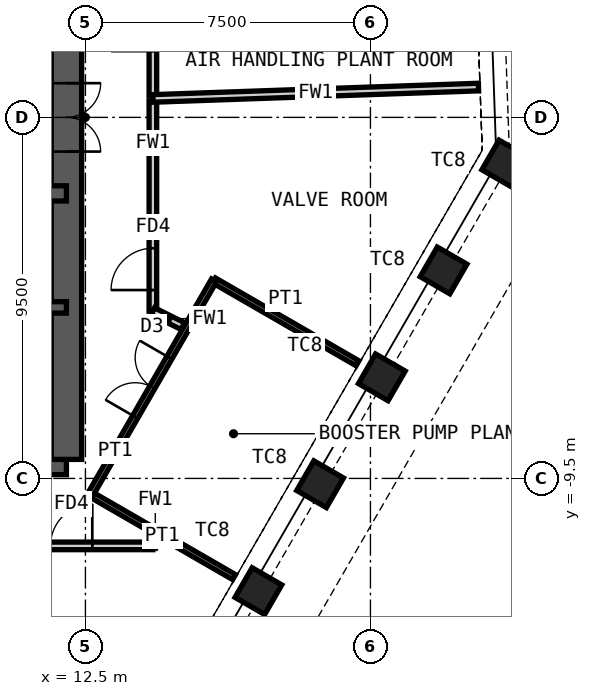
"""IFC4 building model, lengths in metres.
Left out: names, types, materials, properties, quantities, classifications, styles, units other than length and angle.
Written with IfcOpenShell. Run it as: python <this file> out.ifc"""

import sys

from ifc_helpers import new_model, si_unit, direction, frame, frame_2d, origin, origin_2d, place, context, subcontext, project, spatial, rectangle, hollow_rectangle, extrude, element, fill, save


model = new_model("IFC4")
c1 = context("Model", 3, precision=1e-05, world=origin(), true_north=direction((0.0, 1.0)))
c2 = subcontext(c1, "Body", "Model", "MODEL_VIEW")
j1 = project(units=[si_unit("LENGTHUNIT", "METRE"), si_unit("PLANEANGLEUNIT", "RADIAN")], contexts=[c1])
p1 = place(None, origin())
s1 = spatial("IfcSite", under=j1, at=p1, CompositionType="ELEMENT")
p2 = place(p1, origin())
s2 = spatial("IfcBuilding", under=s1, at=p2, CompositionType="ELEMENT")
p3 = place(p2, frame((0.0, 0.0, 337.6)))
s3 = spatial("IfcBuildingStorey", under=s2, at=p3, CompositionType="ELEMENT", Elevation=337.6)
for number, where, z_axis, x_axis in (
    (1, (23.548, -1.214, 0.0), (0.0, 0.0, 1.0), (0.5, 0.866, 0.0)),
    (2, (21.924, -4.027, 0.0), (0.0, 0.0, 1.0), (0.5, 0.866, 0.0)),
    (3, (20.3, -6.84, 0.0), (0.0, 0.0, 1.0), (0.5, 0.866, 0.0)),
    (4, (18.676, -9.653, 0.0), (0.0, 0.0, 1.0), (0.5, 0.866, 0.0)),
    (5, (17.052, -12.466, 0.0), (0.0, 0.0, 1.0), (0.5, 0.866, 0.0)),
):
    element("IfcColumn", number, at=place(p3, frame(where, z_axis=z_axis, x_axis=x_axis)), inside=s3, PredefinedType="COLUMN", context=c2, shape_type="SweptSolid", body=[
        extrude(hollow_rectangle(XDim=0.9, YDim=0.9, WallThickness=0.05, at=origin_2d()), origin(), (0.0, 0.0, 1.0), 6.0),
    ])
p4 = place(p3, frame((-12.0, -9.0, 0.0), z_axis=(0.0, 0.0, 1.0), x_axis=(1.0, 0.0, 0.0)))
e6 = element("IfcWall", 6, at=p4, inside=s3, PredefinedType="SHEAR", context=c2, shape_type="SweptSolid", body=[
    extrude(rectangle(XDim=24.0, YDim=0.8, at=frame_2d((12.0, 0.0))), origin(), (0.0, 0.0, 1.0), 6.0),
])
p5 = place(p4, frame((1.35, 0.0, 0.0)))
e7 = element("IfcOpeningElement", 7, at=p5, cuts=e6, PredefinedType="OPENING", context=c2, shape_type="SweptSolid", body=[
    extrude(rectangle(XDim=1.0, YDim=2.1, at=frame_2d((0.5, 1.05))), frame((0.0, 0.41, 0.0), z_axis=(0.0, -1.0, 0.0), x_axis=(1.0, 0.0, 0.0)), (0.0, 0.0, 1.0), 0.82),
])
p6 = place(p4, frame((5.325, 0.0, 0.0)))
e8 = element("IfcOpeningElement", 8, at=p6, cuts=e6, PredefinedType="OPENING", context=c2, shape_type="SweptSolid", body=[
    extrude(rectangle(XDim=1.15, YDim=2.1, at=frame_2d((0.575, 1.05))), frame((0.0, 0.41, 0.0), z_axis=(0.0, -1.0, 0.0), x_axis=(1.0, 0.0, 0.0)), (0.0, 0.0, 1.0), 0.82),
])
p7 = place(p4, frame((12.6, 0.0, 0.0)))
e9 = element("IfcOpeningElement", 9, at=p7, cuts=e6, PredefinedType="OPENING", context=c2, shape_type="SweptSolid", body=[
    extrude(rectangle(XDim=1.0, YDim=2.1, at=frame_2d((0.5, 1.05))), frame((0.0, 0.41, 0.0), z_axis=(0.0, -1.0, 0.0), x_axis=(1.0, 0.0, 0.0)), (0.0, 0.0, 1.0), 0.82),
])
p8 = place(p3, frame((12.0, -9.0, 0.0), z_axis=(0.0, 0.0, 1.0), x_axis=(0.0, 1.0, 0.0)))
e10 = element("IfcWall", 10, at=p8, inside=s3, PredefinedType="SHEAR", context=c2, shape_type="SweptSolid", body=[
    extrude(rectangle(XDim=18.0, YDim=0.8, at=frame_2d((9.0, 0.0))), origin(), (0.0, 0.0, 1.0), 6.0),
])
p9 = place(p8, frame((8.1, 0.0, 0.0)))
e11 = element("IfcOpeningElement", 11, at=p9, cuts=e10, PredefinedType="OPENING", context=c2, shape_type="SweptSolid", body=[
    extrude(rectangle(XDim=1.8, YDim=2.1, at=frame_2d((0.9, 1.05))), frame((0.0, 0.41, 0.0), z_axis=(0.0, -1.0, 0.0), x_axis=(1.0, 0.0, 0.0)), (0.0, 0.0, 1.0), 0.82),
])
p10 = place(p3, frame((-12.0, -2.0, 0.0), z_axis=(0.0, 0.0, 1.0), x_axis=(1.0, 0.0, 0.0)))
e12 = element("IfcWall", 12, at=p10, inside=s3, PredefinedType="SHEAR", context=c2, shape_type="SweptSolid", body=[
    extrude(rectangle(XDim=24.0, YDim=0.4, at=frame_2d((12.0, 0.0))), origin(), (0.0, 0.0, 1.0), 6.0),
])
p11 = place(p10, frame((1.1, 0.0, 0.0)))
e13 = element("IfcOpeningElement", 13, at=p11, cuts=e12, PredefinedType="OPENING", context=c2, shape_type="SweptSolid", body=[
    extrude(rectangle(XDim=1.1, YDim=2.1, at=frame_2d((0.55, 1.05))), frame((0.0, 0.21, 0.0), z_axis=(0.0, -1.0, 0.0), x_axis=(1.0, 0.0, 0.0)), (0.0, 0.0, 1.0), 0.42),
])
p12 = place(p10, frame((13.55, 0.0, 0.0)))
e14 = element("IfcOpeningElement", 14, at=p12, cuts=e12, PredefinedType="OPENING", context=c2, shape_type="SweptSolid", body=[
    extrude(rectangle(XDim=1.1, YDim=2.1, at=frame_2d((0.55, 1.05))), frame((0.0, 0.21, 0.0), z_axis=(0.0, -1.0, 0.0), x_axis=(1.0, 0.0, 0.0)), (0.0, 0.0, 1.0), 0.42),
])
p13 = place(p10, frame((20.7, 0.0, 0.0)))
e15 = element("IfcOpeningElement", 15, at=p13, cuts=e12, PredefinedType="OPENING", context=c2, shape_type="SweptSolid", body=[
    extrude(rectangle(XDim=1.1, YDim=2.1, at=frame_2d((0.55, 1.05))), frame((0.0, 0.21, 0.0), z_axis=(0.0, -1.0, 0.0), x_axis=(1.0, 0.0, 0.0)), (0.0, 0.0, 1.0), 0.42),
])
p14 = place(p10, frame((4.0, 0.0, 0.0)))
e16 = element("IfcOpeningElement", 16, at=p14, cuts=e12, PredefinedType="OPENING", context=c2, shape_type="SweptSolid", body=[
    extrude(rectangle(XDim=1.0, YDim=2.1, at=frame_2d((0.5, 1.05))), frame((0.0, 0.21, 0.0), z_axis=(0.0, -1.0, 0.0), x_axis=(1.0, 0.0, 0.0)), (0.0, 0.0, 1.0), 0.42),
])
p15 = place(p10, frame((6.8, 0.0, 0.0)))
e17 = element("IfcOpeningElement", 17, at=p15, cuts=e12, PredefinedType="OPENING", context=c2, shape_type="SweptSolid", body=[
    extrude(rectangle(XDim=1.0, YDim=2.1, at=frame_2d((0.5, 1.05))), frame((0.0, 0.21, 0.0), z_axis=(0.0, -1.0, 0.0), x_axis=(1.0, 0.0, 0.0)), (0.0, 0.0, 1.0), 0.42),
])
p16 = place(p10, frame((9.6, 0.0, 0.0)))
e18 = element("IfcOpeningElement", 18, at=p16, cuts=e12, PredefinedType="OPENING", context=c2, shape_type="SweptSolid", body=[
    extrude(rectangle(XDim=1.0, YDim=2.1, at=frame_2d((0.5, 1.05))), frame((0.0, 0.21, 0.0), z_axis=(0.0, -1.0, 0.0), x_axis=(1.0, 0.0, 0.0)), (0.0, 0.0, 1.0), 0.42),
])
p17 = place(p3, frame((-12.0, -5.0, 0.0), z_axis=(0.0, 0.0, 1.0), x_axis=(1.0, 0.0, 0.0)))
e19 = element("IfcWall", 19, at=p17, inside=s3, PredefinedType="SHEAR", context=c2, shape_type="SweptSolid", body=[
    extrude(rectangle(XDim=24.0, YDim=0.3, at=frame_2d((12.0, 0.0))), origin(), (0.0, 0.0, 1.0), 6.0),
])
p18 = place(p3, frame((19.659, -6.47, 0.0), z_axis=(0.0, 0.0, 1.0), x_axis=(-0.866032659912, 0.499987431809, 0.0)))
e20 = element("IfcWall", 20, at=p18, inside=s3, PredefinedType="PARTITIONING", context=c2, shape_type="SweptSolid", body=[
    extrude(rectangle(XDim=4.36, YDim=0.15, at=frame_2d((2.18, 0.0))), origin(), (0.0, 0.0, 1.0), 4.65),
])
p19 = place(p3, frame((16.411, -12.096, 0.0), z_axis=(0.0, 0.0, 1.0), x_axis=(-0.866032659912, 0.499987431809, 0.0)))
e21 = element("IfcWall", 21, at=p19, inside=s3, PredefinedType="PARTITIONING", context=c2, shape_type="SweptSolid", body=[
    extrude(rectangle(XDim=4.36, YDim=0.15, at=frame_2d((2.18, 0.0))), origin(), (0.0, 0.0, 1.0), 4.85),
])
p20 = place(p3, frame((15.883, -4.29, 0.0), z_axis=(0.0, 0.0, 1.0), x_axis=(-0.500003318956, -0.866023487576, 0.0)))
e22 = element("IfcWall", 22, at=p20, inside=s3, PredefinedType="PARTITIONING", context=c2, shape_type="SweptSolid", body=[
    extrude(rectangle(XDim=6.496, YDim=0.15, at=frame_2d((3.248, 0.0))), origin(), (0.0, 0.0, 1.0), 5.75),
])
p21 = place(p20, frame((2.348, 0.0, 0.0)))
e23 = element("IfcOpeningElement", 23, at=p21, cuts=e22, PredefinedType="OPENING", context=c2, shape_type="SweptSolid", body=[
    extrude(rectangle(XDim=1.8, YDim=2.4, at=frame_2d((0.9, 1.2))), frame((0.0, 0.085, 0.0), z_axis=(0.0, -1.0, 0.0), x_axis=(1.0, 0.0, 0.0)), (0.0, 0.0, 1.0), 0.17),
])
p22 = place(p3, frame((14.275, -11.275, 0.0), z_axis=(0.0, 0.0, 1.0), x_axis=(-1.0, 0.0, 0.0)))
e24 = element("IfcWall", 24, at=p22, inside=s3, PredefinedType="PARTITIONING", context=c2, shape_type="SweptSolid", body=[
    extrude(rectangle(XDim=7.146, YDim=0.2, at=frame_2d((3.573, 0.0))), origin(), (0.0, 0.0, 1.0), 5.75),
])
p23 = place(p22, frame((1.594, 0.0, 0.0)))
e25 = element("IfcOpeningElement", 25, at=p23, cuts=e24, PredefinedType="OPENING", context=c2, shape_type="SweptSolid", body=[
    extrude(rectangle(XDim=1.1, YDim=2.1, at=frame_2d((0.55, 1.05))), frame((0.0, 0.11, 0.0), z_axis=(0.0, -1.0, 0.0), x_axis=(1.0, 0.0, 0.0)), (0.0, 0.0, 1.0), 0.22),
])
p24 = place(p3, frame((14.275, -11.275, 0.0), z_axis=(0.0, 0.0, 1.0), x_axis=(0.500616342655, 0.865669265636, 0.0)))
e26 = element("IfcWall", 26, at=p24, inside=s3, PredefinedType="PARTITIONING", context=c2, shape_type="SweptSolid", body=[
    extrude(rectangle(XDim=0.252, YDim=0.2, at=frame_2d((0.126, 0.0))), origin(), (0.0, 0.0, 1.0), 5.75),
])
p25 = place(p3, frame((14.275, 0.432, 0.0), z_axis=(0.0, 0.0, 1.0), x_axis=(0.0, -1.0, 0.0)))
e27 = element("IfcWall", 27, at=p25, inside=s3, PredefinedType="PARTITIONING", context=c2, shape_type="SweptSolid", body=[
    extrude(rectangle(XDim=5.532, YDim=0.2, at=frame_2d((2.766, 0.0))), origin(), (0.0, 0.0, 1.0), 5.75),
])
p26 = place(p25, frame((3.876, 0.0, 0.0)))
e28 = element("IfcOpeningElement", 28, at=p26, cuts=e27, PredefinedType="OPENING", context=c2, shape_type="SweptSolid", body=[
    extrude(rectangle(XDim=1.1, YDim=2.1, at=frame_2d((0.55, 1.05))), frame((0.0, 0.11, 0.0), z_axis=(0.0, -1.0, 0.0), x_axis=(1.0, 0.0, 0.0)), (0.0, 0.0, 1.0), 0.22),
])
p27 = place(p3, frame((14.275, -5.1, 0.0), z_axis=(0.0, 0.0, 1.0), x_axis=(0.895092932875, -0.445879626712, 0.0)))
e29 = element("IfcWall", 29, at=p27, inside=s3, PredefinedType="PARTITIONING", context=c2, shape_type="SweptSolid", body=[
    extrude(rectangle(XDim=0.879, YDim=0.2, at=frame_2d((0.439, 0.0))), origin(), (0.0, 0.0, 1.0), 4.65),
])
p28 = place(p3, frame((14.275, 6.32, 0.0), z_axis=(0.0, 0.0, 1.0), x_axis=(0.0, -1.0, 0.0)))
e30 = element("IfcWall", 30, at=p28, inside=s3, PredefinedType="PARTITIONING", context=c2, shape_type="SweptSolid", body=[
    extrude(rectangle(XDim=5.755, YDim=0.2, at=frame_2d((2.877, 0.0))), origin(), (0.0, 0.0, 1.0), 5.75),
])
p29 = place(p28, frame((3.479, 0.0, 0.0)))
e31 = element("IfcOpeningElement", 31, at=p29, cuts=e30, PredefinedType="OPENING", context=c2, shape_type="SweptSolid", body=[
    extrude(rectangle(XDim=1.1, YDim=2.1, at=frame_2d((0.55, 1.05))), frame((0.0, 0.11, 0.0), z_axis=(0.0, -1.0, 0.0), x_axis=(1.0, 0.0, 0.0)), (0.0, 0.0, 1.0), 0.22),
])
p30 = place(p3, frame((14.275, 0.499, 0.0), z_axis=(0.0, 0.0, 1.0), x_axis=(0.999391402264, 0.034883019939, 0.0)))
e32 = element("IfcWall", 32, at=p30, inside=s3, PredefinedType="PARTITIONING", context=c2, shape_type="SweptSolid", body=[
    extrude(rectangle(XDim=8.573, YDim=0.2, at=frame_2d((4.287, 0.0))), origin(), (0.0, 0.0, 1.0), 5.75),
])
p31 = place(p3, frame((7.045, -11.275, 0.0), z_axis=(0.0, 0.0, 1.0), x_axis=(0.529913212647, -0.848051877577, 0.0)))
e33 = element("IfcWall", 33, at=p31, inside=s3, PredefinedType="PARTITIONING", context=c2, shape_type="SweptSolid", body=[
    extrude(rectangle(XDim=8.704, YDim=0.2, at=frame_2d((4.352, 0.0))), origin(), (0.0, 0.0, 1.0), 5.75),
])
p32 = place(p9, origin())
e34 = element("IfcDoor", 34, at=p32, inside=s3, OperationType="DOUBLE_DOOR_DOUBLE_SWING", PredefinedType="DOOR", context=c2, shape_type="SweptSolid", body=[
    extrude(rectangle(XDim=1.8, YDim=2.1, at=frame_2d((0.9, 1.05))), frame((0.0, 0.025, 0.0), z_axis=(0.0, -1.0, 0.0), x_axis=(1.0, 0.0, 0.0)), (0.0, 0.0, 1.0), 0.05),
])
fill(e11, e34)
p33 = place(p21, origin())
e35 = element("IfcDoor", 35, at=p33, inside=s3, OperationType="DOUBLE_DOOR_DOUBLE_SWING", PredefinedType="DOOR", context=c2, shape_type="SweptSolid", body=[
    extrude(rectangle(XDim=1.8, YDim=2.4, at=frame_2d((0.9, 1.2))), frame((0.0, 0.025, 0.0), z_axis=(0.0, -1.0, 0.0), x_axis=(1.0, 0.0, 0.0)), (0.0, 0.0, 1.0), 0.05),
])
fill(e23, e35)
p34 = place(p23, origin())
e36 = element("IfcDoor", 36, at=p34, inside=s3, OperationType="SINGLE_SWING_LEFT", PredefinedType="DOOR", context=c2, shape_type="SweptSolid", body=[
    extrude(rectangle(XDim=1.1, YDim=2.1, at=frame_2d((0.55, 1.05))), frame((0.0, 0.025, 0.0), z_axis=(0.0, -1.0, 0.0), x_axis=(1.0, 0.0, 0.0)), (0.0, 0.0, 1.0), 0.05),
])
fill(e25, e36)
p35 = place(p26, origin())
e37 = element("IfcDoor", 37, at=p35, inside=s3, OperationType="SINGLE_SWING_RIGHT", PredefinedType="DOOR", context=c2, shape_type="SweptSolid", body=[
    extrude(rectangle(XDim=1.1, YDim=2.1, at=frame_2d((0.55, 1.05))), frame((0.0, 0.025, 0.0), z_axis=(0.0, -1.0, 0.0), x_axis=(1.0, 0.0, 0.0)), (0.0, 0.0, 1.0), 0.05),
])
fill(e28, e37)
save(model, sys.argv[1])
